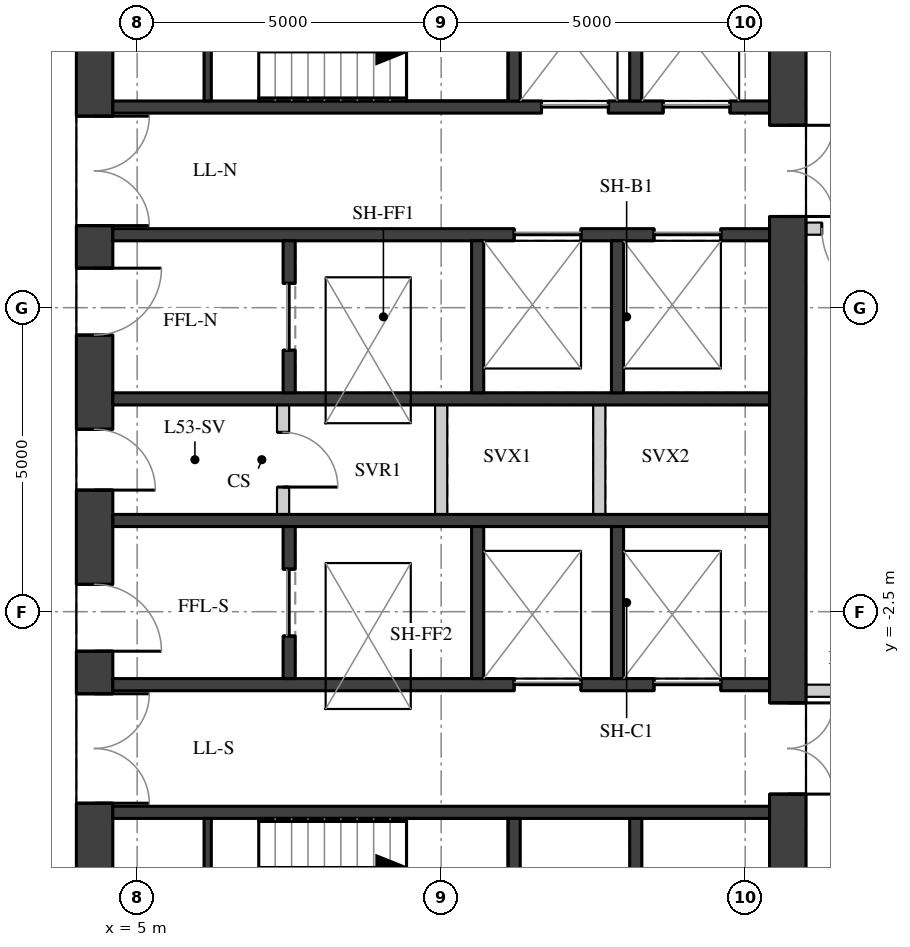
"""IFC4 building model, lengths in metres.
Left out: names, types, materials, properties, quantities, classifications, styles, units other than length and angle.
Written with IfcOpenShell. Run it as: python <this file> out.ifc"""

import sys

from ifc_helpers import new_model, si_unit, direction, frame, frame_2d, origin, place, context, subcontext, project, spatial, rectangle, extrude, element, fill, save


model = new_model("IFC4")
c1 = context("Model", 3, precision=1e-05, world=origin(), true_north=direction((0.0, 1.0)))
c2 = subcontext(c1, "Body", "Model", "MODEL_VIEW")
j1 = project(units=[si_unit("LENGTHUNIT", "METRE"), si_unit("PLANEANGLEUNIT", "RADIAN")], contexts=[c1])
p1 = place(None, origin())
s1 = spatial("IfcSite", under=j1, at=p1, CompositionType="ELEMENT")
p2 = place(p1, origin())
s2 = spatial("IfcBuilding", under=s1, at=p2, CompositionType="ELEMENT")
p3 = place(p2, frame((0.0, 0.0, 189.2)))
s3 = spatial("IfcBuildingStorey", under=s2, at=p3, CompositionType="ELEMENT", Elevation=189.2)
p4 = place(p3, frame((4.3, -9.4, 0.0), z_axis=(0.0, 0.0, 1.0), x_axis=(0.0, 1.0, 0.0)))
e1 = element("IfcWall", 1, at=p4, inside=s3, PredefinedType="SHEAR", context=c2, shape_type="SweptSolid", body=[
    extrude(rectangle(XDim=18.8, YDim=0.6, at=frame_2d((9.4, 0.0))), origin(), (0.0, 0.0, 1.0), 3.02),
])
p5 = place(p4, frame((0.65, 0.0, 0.0)))
e2 = element("IfcOpeningElement", 2, at=p5, cuts=e1, PredefinedType="OPENING", context=c2, shape_type="SweptSolid", body=[
    extrude(rectangle(XDim=1.5, YDim=2.1, at=frame_2d((0.75, 1.05))), frame((0.0, 0.31, 0.0), z_axis=(0.0, -1.0, 0.0), x_axis=(1.0, 0.0, 0.0)), (0.0, 0.0, 1.0), 0.62),
])
p6 = place(p4, frame((3.75, 0.0, 0.0)))
e3 = element("IfcOpeningElement", 3, at=p6, cuts=e1, PredefinedType="OPENING", context=c2, shape_type="SweptSolid", body=[
    extrude(rectangle(XDim=1.8, YDim=2.1, at=frame_2d((0.9, 1.05))), frame((0.0, 0.31, 0.0), z_axis=(0.0, -1.0, 0.0), x_axis=(1.0, 0.0, 0.0)), (0.0, 0.0, 1.0), 0.62),
])
p7 = place(p4, frame((6.25, 0.0, 0.0)))
e4 = element("IfcOpeningElement", 4, at=p7, cuts=e1, PredefinedType="OPENING", context=c2, shape_type="SweptSolid", body=[
    extrude(rectangle(XDim=1.1, YDim=2.1, at=frame_2d((0.55, 1.05))), frame((0.0, 0.31, 0.0), z_axis=(0.0, -1.0, 0.0), x_axis=(1.0, 0.0, 0.0)), (0.0, 0.0, 1.0), 0.62),
])
p8 = place(p4, frame((8.9, 0.0, 0.0)))
e5 = element("IfcOpeningElement", 5, at=p8, cuts=e1, PredefinedType="OPENING", context=c2, shape_type="SweptSolid", body=[
    extrude(rectangle(XDim=1.0, YDim=2.1, at=frame_2d((0.5, 1.05))), frame((0.0, 0.31, 0.0), z_axis=(0.0, -1.0, 0.0), x_axis=(1.0, 0.0, 0.0)), (0.0, 0.0, 1.0), 0.62),
])
p9 = place(p4, frame((11.45, 0.0, 0.0)))
e6 = element("IfcOpeningElement", 6, at=p9, cuts=e1, PredefinedType="OPENING", context=c2, shape_type="SweptSolid", body=[
    extrude(rectangle(XDim=1.1, YDim=2.1, at=frame_2d((0.55, 1.05))), frame((0.0, 0.31, 0.0), z_axis=(0.0, -1.0, 0.0), x_axis=(1.0, 0.0, 0.0)), (0.0, 0.0, 1.0), 0.62),
])
p10 = place(p4, frame((13.25, 0.0, 0.0)))
e7 = element("IfcOpeningElement", 7, at=p10, cuts=e1, PredefinedType="OPENING", context=c2, shape_type="SweptSolid", body=[
    extrude(rectangle(XDim=1.8, YDim=2.1, at=frame_2d((0.9, 1.05))), frame((0.0, 0.31, 0.0), z_axis=(0.0, -1.0, 0.0), x_axis=(1.0, 0.0, 0.0)), (0.0, 0.0, 1.0), 0.62),
])
p11 = place(p4, frame((16.65, 0.0, 0.0)))
e8 = element("IfcOpeningElement", 8, at=p11, cuts=e1, PredefinedType="OPENING", context=c2, shape_type="SweptSolid", body=[
    extrude(rectangle(XDim=1.5, YDim=2.1, at=frame_2d((0.75, 1.05))), frame((0.0, 0.31, 0.0), z_axis=(0.0, -1.0, 0.0), x_axis=(1.0, 0.0, 0.0)), (0.0, 0.0, 1.0), 0.62),
])
p12 = place(p3, frame((15.7, -9.4, 0.0), z_axis=(0.0, 0.0, 1.0), x_axis=(0.0, 1.0, 0.0)))
e9 = element("IfcWall", 9, at=p12, inside=s3, PredefinedType="SHEAR", context=c2, shape_type="SweptSolid", body=[
    extrude(rectangle(XDim=18.8, YDim=0.6, at=frame_2d((9.4, 0.0))), origin(), (0.0, 0.0, 1.0), 3.02),
])
p13 = place(p12, frame((13.4, 0.0, 0.0)))
e10 = element("IfcOpeningElement", 10, at=p13, cuts=e9, PredefinedType="OPENING", context=c2, shape_type="SweptSolid", body=[
    extrude(rectangle(XDim=1.5, YDim=2.1, at=frame_2d((0.75, 1.05))), frame((0.0, 0.31, 0.0), z_axis=(0.0, -1.0, 0.0), x_axis=(1.0, 0.0, 0.0)), (0.0, 0.0, 1.0), 0.62),
])
p14 = place(p12, frame((3.9, 0.0, 0.0)))
e11 = element("IfcOpeningElement", 11, at=p14, cuts=e9, PredefinedType="OPENING", context=c2, shape_type="SweptSolid", body=[
    extrude(rectangle(XDim=1.5, YDim=2.1, at=frame_2d((0.75, 1.05))), frame((0.0, 0.31, 0.0), z_axis=(0.0, -1.0, 0.0), x_axis=(1.0, 0.0, 0.0)), (0.0, 0.0, 1.0), 0.62),
])
p15 = place(p3, frame((4.6, 5.8, 0.0), z_axis=(0.0, 0.0, 1.0), x_axis=(1.0, 0.0, 0.0)))
e12 = element("IfcWall", 12, at=p15, inside=s3, PredefinedType="SHEAR", context=c2, shape_type="SweptSolid", body=[
    extrude(rectangle(XDim=10.8, YDim=0.2, at=frame_2d((5.4, 0.0))), origin(), (0.0, 0.0, 1.0), 3.02),
])
p16 = place(p15, frame((7.05, 0.0, 0.0)))
e13 = element("IfcOpeningElement", 13, at=p16, cuts=e12, PredefinedType="OPENING", context=c2, shape_type="SweptSolid", body=[
    extrude(rectangle(XDim=1.1, YDim=2.1, at=frame_2d((0.55, 1.05))), frame((0.0, 0.11, 0.0), z_axis=(0.0, -1.0, 0.0), x_axis=(1.0, 0.0, 0.0)), (0.0, 0.0, 1.0), 0.22),
])
p17 = place(p15, frame((9.05, 0.0, 0.0)))
e14 = element("IfcOpeningElement", 14, at=p17, cuts=e12, PredefinedType="OPENING", context=c2, shape_type="SweptSolid", body=[
    extrude(rectangle(XDim=1.1, YDim=2.1, at=frame_2d((0.55, 1.05))), frame((0.0, 0.11, 0.0), z_axis=(0.0, -1.0, 0.0), x_axis=(1.0, 0.0, 0.0)), (0.0, 0.0, 1.0), 0.22),
])
p18 = place(p3, frame((4.6, 3.7, 0.0), z_axis=(0.0, 0.0, 1.0), x_axis=(1.0, 0.0, 0.0)))
e15 = element("IfcWall", 15, at=p18, inside=s3, PredefinedType="SHEAR", context=c2, shape_type="SweptSolid", body=[
    extrude(rectangle(XDim=10.8, YDim=0.2, at=frame_2d((5.4, 0.0))), origin(), (0.0, 0.0, 1.0), 3.02),
])
p19 = place(p18, frame((6.6, 0.0, 0.0)))
e16 = element("IfcOpeningElement", 16, at=p19, cuts=e15, PredefinedType="OPENING", context=c2, shape_type="SweptSolid", body=[
    extrude(rectangle(XDim=1.1, YDim=2.1, at=frame_2d((0.55, 1.05))), frame((0.0, 0.11, 0.0), z_axis=(0.0, -1.0, 0.0), x_axis=(1.0, 0.0, 0.0)), (0.0, 0.0, 1.0), 0.22),
])
p20 = place(p18, frame((8.9, 0.0, 0.0)))
e17 = element("IfcOpeningElement", 17, at=p20, cuts=e15, PredefinedType="OPENING", context=c2, shape_type="SweptSolid", body=[
    extrude(rectangle(XDim=1.1, YDim=2.1, at=frame_2d((0.55, 1.05))), frame((0.0, 0.11, 0.0), z_axis=(0.0, -1.0, 0.0), x_axis=(1.0, 0.0, 0.0)), (0.0, 0.0, 1.0), 0.22),
])
for number, where, z_axis, x_axis in (
    (18, (4.6, 1.0, 0.0), (0.0, 0.0, 1.0), (1.0, 0.0, 0.0)),
    (19, (4.6, -1.0, 0.0), (0.0, 0.0, 1.0), (1.0, 0.0, 0.0)),
):
    element("IfcWall", number, at=place(p3, frame(where, z_axis=z_axis, x_axis=x_axis)), inside=s3, PredefinedType="SHEAR", context=c2, shape_type="SweptSolid", body=[
        extrude(rectangle(XDim=10.8, YDim=0.2, at=frame_2d((5.4, 0.0))), origin(), (0.0, 0.0, 1.0), 3.02),
    ])
p21 = place(p3, frame((4.6, -3.7, 0.0), z_axis=(0.0, 0.0, 1.0), x_axis=(1.0, 0.0, 0.0)))
e20 = element("IfcWall", 20, at=p21, inside=s3, PredefinedType="SHEAR", context=c2, shape_type="SweptSolid", body=[
    extrude(rectangle(XDim=10.8, YDim=0.2, at=frame_2d((5.4, 0.0))), origin(), (0.0, 0.0, 1.0), 3.02),
])
p22 = place(p21, frame((6.6, 0.0, 0.0)))
e21 = element("IfcOpeningElement", 21, at=p22, cuts=e20, PredefinedType="OPENING", context=c2, shape_type="SweptSolid", body=[
    extrude(rectangle(XDim=1.1, YDim=2.1, at=frame_2d((0.55, 1.05))), frame((0.0, 0.11, 0.0), z_axis=(0.0, -1.0, 0.0), x_axis=(1.0, 0.0, 0.0)), (0.0, 0.0, 1.0), 0.22),
])
p23 = place(p21, frame((8.9, 0.0, 0.0)))
e22 = element("IfcOpeningElement", 22, at=p23, cuts=e20, PredefinedType="OPENING", context=c2, shape_type="SweptSolid", body=[
    extrude(rectangle(XDim=1.1, YDim=2.1, at=frame_2d((0.55, 1.05))), frame((0.0, 0.11, 0.0), z_axis=(0.0, -1.0, 0.0), x_axis=(1.0, 0.0, 0.0)), (0.0, 0.0, 1.0), 0.22),
])
p24 = place(p3, frame((4.6, -5.8, 0.0), z_axis=(0.0, 0.0, 1.0), x_axis=(1.0, 0.0, 0.0)))
e23 = element("IfcWall", 23, at=p24, inside=s3, PredefinedType="SHEAR", context=c2, shape_type="SweptSolid", body=[
    extrude(rectangle(XDim=10.8, YDim=0.2, at=frame_2d((5.4, 0.0))), origin(), (0.0, 0.0, 1.0), 3.02),
])
for number, where, z_axis, x_axis in (
    (24, (11.2, 5.9, 0.0), (0.0, 0.0, 1.0), (0.0, 1.0, 0.0)),
    (25, (11.2, -9.4, 0.0), (0.0, 0.0, 1.0), (0.0, 1.0, 0.0)),
    (26, (13.2, 5.9, 0.0), (0.0, 0.0, 1.0), (0.0, 1.0, 0.0)),
    (27, (13.2, -9.4, 0.0), (0.0, 0.0, 1.0), (0.0, 1.0, 0.0)),
):
    element("IfcWall", number, at=place(p3, frame(where, z_axis=z_axis, x_axis=x_axis)), inside=s3, PredefinedType="SHEAR", context=c2, shape_type="SweptSolid", body=[
        extrude(rectangle(XDim=3.5, YDim=0.2, at=frame_2d((1.75, 0.0))), origin(), (0.0, 0.0, 1.0), 3.02),
    ])
p25 = place(p3, frame((7.5, 1.1, 0.0), z_axis=(0.0, 0.0, 1.0), x_axis=(0.0, 1.0, 0.0)))
e28 = element("IfcWall", 28, at=p25, inside=s3, PredefinedType="SHEAR", context=c2, shape_type="SweptSolid", body=[
    extrude(rectangle(XDim=2.5, YDim=0.2, at=frame_2d((1.25, 0.0))), origin(), (0.0, 0.0, 1.0), 3.02),
])
p26 = place(p25, frame((0.7, 0.0, 0.0)))
e29 = element("IfcOpeningElement", 29, at=p26, cuts=e28, PredefinedType="OPENING", context=c2, shape_type="SweptSolid", body=[
    extrude(rectangle(XDim=1.1, YDim=2.1, at=frame_2d((0.55, 1.05))), frame((0.0, 0.11, 0.0), z_axis=(0.0, -1.0, 0.0), x_axis=(1.0, 0.0, 0.0)), (0.0, 0.0, 1.0), 0.22),
])
p27 = place(p3, frame((7.5, -3.6, 0.0), z_axis=(0.0, 0.0, 1.0), x_axis=(0.0, 1.0, 0.0)))
e30 = element("IfcWall", 30, at=p27, inside=s3, PredefinedType="SHEAR", context=c2, shape_type="SweptSolid", body=[
    extrude(rectangle(XDim=2.5, YDim=0.2, at=frame_2d((1.25, 0.0))), origin(), (0.0, 0.0, 1.0), 3.02),
])
p28 = place(p27, frame((0.7, 0.0, 0.0)))
e31 = element("IfcOpeningElement", 31, at=p28, cuts=e30, PredefinedType="OPENING", context=c2, shape_type="SweptSolid", body=[
    extrude(rectangle(XDim=1.1, YDim=2.1, at=frame_2d((0.55, 1.05))), frame((0.0, 0.11, 0.0), z_axis=(0.0, -1.0, 0.0), x_axis=(1.0, 0.0, 0.0)), (0.0, 0.0, 1.0), 0.22),
])
for number, where, z_axis, x_axis in (
    (32, (10.6, 1.1, 0.0), (0.0, 0.0, 1.0), (0.0, 1.0, 0.0)),
    (33, (10.6, -3.6, 0.0), (0.0, 0.0, 1.0), (0.0, 1.0, 0.0)),
    (34, (12.9, 1.1, 0.0), (0.0, 0.0, 1.0), (0.0, 1.0, 0.0)),
    (35, (12.9, -3.6, 0.0), (0.0, 0.0, 1.0), (0.0, 1.0, 0.0)),
):
    element("IfcWall", number, at=place(p3, frame(where, z_axis=z_axis, x_axis=x_axis)), inside=s3, PredefinedType="SHEAR", context=c2, shape_type="SweptSolid", body=[
        extrude(rectangle(XDim=2.5, YDim=0.2, at=frame_2d((1.25, 0.0))), origin(), (0.0, 0.0, 1.0), 3.02),
    ])
p29 = place(p3, frame((6.16, 5.9, 0.0), z_axis=(0.0, 0.0, 1.0), x_axis=(0.0, 1.0, 0.0)))
e36 = element("IfcWall", 36, at=p29, inside=s3, PredefinedType="SHEAR", context=c2, shape_type="SweptSolid", body=[
    extrude(rectangle(XDim=3.5, YDim=0.12, at=frame_2d((1.75, 0.0))), origin(), (0.0, 0.0, 1.0), 3.02),
])
p30 = place(p29, frame((0.85, 0.0, 0.0)))
e37 = element("IfcOpeningElement", 37, at=p30, cuts=e36, PredefinedType="OPENING", context=c2, shape_type="SweptSolid", body=[
    extrude(rectangle(XDim=1.5, YDim=2.1, at=frame_2d((0.75, 1.05))), frame((0.0, 0.07, 0.0), z_axis=(0.0, -1.0, 0.0), x_axis=(1.0, 0.0, 0.0)), (0.0, 0.0, 1.0), 0.14),
])
p31 = place(p3, frame((6.16, -9.4, 0.0), z_axis=(0.0, 0.0, 1.0), x_axis=(0.0, 1.0, 0.0)))
e38 = element("IfcWall", 38, at=p31, inside=s3, PredefinedType="SHEAR", context=c2, shape_type="SweptSolid", body=[
    extrude(rectangle(XDim=3.5, YDim=0.12, at=frame_2d((1.75, 0.0))), origin(), (0.0, 0.0, 1.0), 3.02),
])
p32 = place(p31, frame((1.15, 0.0, 0.0)))
e39 = element("IfcOpeningElement", 39, at=p32, cuts=e38, PredefinedType="OPENING", context=c2, shape_type="SweptSolid", body=[
    extrude(rectangle(XDim=1.5, YDim=2.1, at=frame_2d((0.75, 1.05))), frame((0.0, 0.07, 0.0), z_axis=(0.0, -1.0, 0.0), x_axis=(1.0, 0.0, 0.0)), (0.0, 0.0, 1.0), 0.14),
])
p33 = place(p3, frame((7.4, -0.9, 0.0), z_axis=(0.0, 0.0, 1.0), x_axis=(0.0, 1.0, 0.0)))
e40 = element("IfcWall", 40, at=p33, inside=s3, PredefinedType="PARTITIONING", context=c2, shape_type="SweptSolid", body=[
    extrude(rectangle(XDim=1.8, YDim=0.2, at=frame_2d((0.9, 0.0))), origin(), (0.0, 0.0, 1.0), 3.02),
])
p34 = place(p33, frame((0.45, 0.0, 0.0)))
e41 = element("IfcOpeningElement", 41, at=p34, cuts=e40, PredefinedType="OPENING", context=c2, shape_type="SweptSolid", body=[
    extrude(rectangle(XDim=0.9, YDim=2.1, at=frame_2d((0.45, 1.05))), frame((0.0, 0.11, 0.0), z_axis=(0.0, -1.0, 0.0), x_axis=(1.0, 0.0, 0.0)), (0.0, 0.0, 1.0), 0.22),
])
for number, where, z_axis, x_axis in (
    (42, (10.0, -0.9, 0.0), (0.0, 0.0, 1.0), (0.0, 1.0, 0.0)),
    (43, (12.6, -0.9, 0.0), (0.0, 0.0, 1.0), (0.0, 1.0, 0.0)),
):
    element("IfcWall", number, at=place(p3, frame(where, z_axis=z_axis, x_axis=x_axis)), inside=s3, PredefinedType="PARTITIONING", context=c2, shape_type="SweptSolid", body=[
        extrude(rectangle(XDim=1.8, YDim=0.2, at=frame_2d((0.9, 0.0))), origin(), (0.0, 0.0, 1.0), 3.02),
    ])
p35 = place(p3, frame((17.6, 3.8, 0.0), z_axis=(0.0, 0.0, 1.0), x_axis=(-1.0, 0.0, 0.0)))
e44 = element("IfcWall", 44, at=p35, inside=s3, PredefinedType="PARTITIONING", context=c2, shape_type="SweptSolid", body=[
    extrude(rectangle(XDim=1.596, YDim=0.2, at=frame_2d((0.798, 0.0))), origin(), (0.0, 0.0, 1.0), 3.02),
])
p36 = place(p35, frame((0.14, 0.0, 0.0)))
e45 = element("IfcOpeningElement", 45, at=p36, cuts=e44, PredefinedType="OPENING", context=c2, shape_type="SweptSolid", body=[
    extrude(rectangle(XDim=1.2, YDim=2.1, at=frame_2d((0.6, 1.05))), frame((0.0, 0.11, 0.0), z_axis=(0.0, -1.0, 0.0), x_axis=(1.0, 0.0, 0.0)), (0.0, 0.0, 1.0), 0.22),
])
p37 = place(p3, frame((16.004, -3.8, 0.0), z_axis=(0.0, 0.0, 1.0), x_axis=(1.0, 0.0, 0.0)))
e46 = element("IfcWall", 46, at=p37, inside=s3, PredefinedType="PARTITIONING", context=c2, shape_type="SweptSolid", body=[
    extrude(rectangle(XDim=1.596, YDim=0.2, at=frame_2d((0.798, 0.0))), origin(), (0.0, 0.0, 1.0), 2.47),
])
p38 = place(p6, origin())
e47 = element("IfcDoor", 47, at=p38, inside=s3, OperationType="DOUBLE_DOOR_SINGLE_SWING", PredefinedType="DOOR", context=c2, shape_type="SweptSolid", body=[
    extrude(rectangle(XDim=1.8, YDim=2.1, at=frame_2d((0.9, 1.05))), frame((0.0, 0.025, 0.0), z_axis=(0.0, -1.0, 0.0), x_axis=(1.0, 0.0, 0.0)), (0.0, 0.0, 1.0), 0.05),
])
fill(e3, e47)
p39 = place(p7, origin())
e48 = element("IfcDoor", 48, at=p39, inside=s3, OperationType="SINGLE_SWING_RIGHT", PredefinedType="DOOR", context=c2, shape_type="SweptSolid", body=[
    extrude(rectangle(XDim=1.1, YDim=2.1, at=frame_2d((0.55, 1.05))), frame((0.0, 0.025, 0.0), z_axis=(0.0, -1.0, 0.0), x_axis=(1.0, 0.0, 0.0)), (0.0, 0.0, 1.0), 0.05),
])
fill(e4, e48)
p40 = place(p8, origin())
e49 = element("IfcDoor", 49, at=p40, inside=s3, OperationType="SINGLE_SWING_RIGHT", PredefinedType="DOOR", context=c2, shape_type="SweptSolid", body=[
    extrude(rectangle(XDim=1.0, YDim=2.1, at=frame_2d((0.5, 1.05))), frame((0.0, 0.025, 0.0), z_axis=(0.0, -1.0, 0.0), x_axis=(1.0, 0.0, 0.0)), (0.0, 0.0, 1.0), 0.05),
])
fill(e5, e49)
p41 = place(p9, origin())
e50 = element("IfcDoor", 50, at=p41, inside=s3, OperationType="SINGLE_SWING_LEFT", PredefinedType="DOOR", context=c2, shape_type="SweptSolid", body=[
    extrude(rectangle(XDim=1.1, YDim=2.1, at=frame_2d((0.55, 1.05))), frame((0.0, 0.025, 0.0), z_axis=(0.0, -1.0, 0.0), x_axis=(1.0, 0.0, 0.0)), (0.0, 0.0, 1.0), 0.05),
])
fill(e6, e50)
p42 = place(p10, origin())
e51 = element("IfcDoor", 51, at=p42, inside=s3, OperationType="DOUBLE_DOOR_SINGLE_SWING", PredefinedType="DOOR", context=c2, shape_type="SweptSolid", body=[
    extrude(rectangle(XDim=1.8, YDim=2.1, at=frame_2d((0.9, 1.05))), frame((0.0, 0.025, 0.0), z_axis=(0.0, -1.0, 0.0), x_axis=(1.0, 0.0, 0.0)), (0.0, 0.0, 1.0), 0.05),
])
fill(e7, e51)
p43 = place(p13, origin())
e52 = element("IfcDoor", 52, at=p43, inside=s3, OperationType="DOUBLE_DOOR_SINGLE_SWING", PredefinedType="DOOR", context=c2, shape_type="SweptSolid", body=[
    extrude(rectangle(XDim=1.5, YDim=2.1, at=frame_2d((0.75, 1.05))), frame((0.0, 0.025, 0.0), z_axis=(0.0, -1.0, 0.0), x_axis=(1.0, 0.0, 0.0)), (0.0, 0.0, 1.0), 0.05),
])
fill(e10, e52)
p44 = place(p14, origin())
e53 = element("IfcDoor", 53, at=p44, inside=s3, OperationType="DOUBLE_DOOR_SINGLE_SWING", PredefinedType="DOOR", context=c2, shape_type="SweptSolid", body=[
    extrude(rectangle(XDim=1.5, YDim=2.1, at=frame_2d((0.75, 1.05))), frame((0.0, 0.025, 0.0), z_axis=(0.0, -1.0, 0.0), x_axis=(1.0, 0.0, 0.0)), (0.0, 0.0, 1.0), 0.05),
])
fill(e11, e53)
p45 = place(p16, origin())
e54 = element("IfcDoor", 54, at=p45, inside=s3, OperationType="DOUBLE_DOOR_SLIDING", PredefinedType="DOOR", context=c2, shape_type="SweptSolid", body=[
    extrude(rectangle(XDim=1.1, YDim=2.1, at=frame_2d((0.55, 1.05))), frame((0.0, 0.025, 0.0), z_axis=(0.0, -1.0, 0.0), x_axis=(1.0, 0.0, 0.0)), (0.0, 0.0, 1.0), 0.05),
])
fill(e13, e54)
p46 = place(p17, origin())
e55 = element("IfcDoor", 55, at=p46, inside=s3, OperationType="DOUBLE_DOOR_SLIDING", PredefinedType="DOOR", context=c2, shape_type="SweptSolid", body=[
    extrude(rectangle(XDim=1.1, YDim=2.1, at=frame_2d((0.55, 1.05))), frame((0.0, 0.025, 0.0), z_axis=(0.0, -1.0, 0.0), x_axis=(1.0, 0.0, 0.0)), (0.0, 0.0, 1.0), 0.05),
])
fill(e14, e55)
p47 = place(p19, origin())
e56 = element("IfcDoor", 56, at=p47, inside=s3, OperationType="DOUBLE_DOOR_SLIDING", PredefinedType="DOOR", context=c2, shape_type="SweptSolid", body=[
    extrude(rectangle(XDim=1.1, YDim=2.1, at=frame_2d((0.55, 1.05))), frame((0.0, 0.025, 0.0), z_axis=(0.0, -1.0, 0.0), x_axis=(1.0, 0.0, 0.0)), (0.0, 0.0, 1.0), 0.05),
])
fill(e16, e56)
p48 = place(p20, origin())
e57 = element("IfcDoor", 57, at=p48, inside=s3, OperationType="DOUBLE_DOOR_SLIDING", PredefinedType="DOOR", context=c2, shape_type="SweptSolid", body=[
    extrude(rectangle(XDim=1.1, YDim=2.1, at=frame_2d((0.55, 1.05))), frame((0.0, 0.025, 0.0), z_axis=(0.0, -1.0, 0.0), x_axis=(1.0, 0.0, 0.0)), (0.0, 0.0, 1.0), 0.05),
])
fill(e17, e57)
p49 = place(p22, origin())
e58 = element("IfcDoor", 58, at=p49, inside=s3, OperationType="DOUBLE_DOOR_SLIDING", PredefinedType="DOOR", context=c2, shape_type="SweptSolid", body=[
    extrude(rectangle(XDim=1.1, YDim=2.1, at=frame_2d((0.55, 1.05))), frame((0.0, 0.025, 0.0), z_axis=(0.0, -1.0, 0.0), x_axis=(1.0, 0.0, 0.0)), (0.0, 0.0, 1.0), 0.05),
])
fill(e21, e58)
p50 = place(p23, origin())
e59 = element("IfcDoor", 59, at=p50, inside=s3, OperationType="DOUBLE_DOOR_SLIDING", PredefinedType="DOOR", context=c2, shape_type="SweptSolid", body=[
    extrude(rectangle(XDim=1.1, YDim=2.1, at=frame_2d((0.55, 1.05))), frame((0.0, 0.025, 0.0), z_axis=(0.0, -1.0, 0.0), x_axis=(1.0, 0.0, 0.0)), (0.0, 0.0, 1.0), 0.05),
])
fill(e22, e59)
p51 = place(p26, origin())
e60 = element("IfcDoor", 60, at=p51, inside=s3, OperationType="DOUBLE_DOOR_SLIDING", PredefinedType="DOOR", context=c2, shape_type="SweptSolid", body=[
    extrude(rectangle(XDim=1.1, YDim=2.1, at=frame_2d((0.55, 1.05))), frame((0.0, 0.025, 0.0), z_axis=(0.0, -1.0, 0.0), x_axis=(1.0, 0.0, 0.0)), (0.0, 0.0, 1.0), 0.05),
])
fill(e29, e60)
p52 = place(p28, origin())
e61 = element("IfcDoor", 61, at=p52, inside=s3, OperationType="DOUBLE_DOOR_SLIDING", PredefinedType="DOOR", context=c2, shape_type="SweptSolid", body=[
    extrude(rectangle(XDim=1.1, YDim=2.1, at=frame_2d((0.55, 1.05))), frame((0.0, 0.025, 0.0), z_axis=(0.0, -1.0, 0.0), x_axis=(1.0, 0.0, 0.0)), (0.0, 0.0, 1.0), 0.05),
])
fill(e31, e61)
p53 = place(p34, origin())
e62 = element("IfcDoor", 62, at=p53, inside=s3, OperationType="SINGLE_SWING_RIGHT", PredefinedType="DOOR", context=c2, shape_type="SweptSolid", body=[
    extrude(rectangle(XDim=0.9, YDim=2.1, at=frame_2d((0.45, 1.05))), frame((0.0, 0.025, 0.0), z_axis=(0.0, -1.0, 0.0), x_axis=(1.0, 0.0, 0.0)), (0.0, 0.0, 1.0), 0.05),
])
fill(e41, e62)
p54 = place(p36, origin())
e63 = element("IfcDoor", 63, at=p54, inside=s3, OperationType="SINGLE_SWING_LEFT", PredefinedType="DOOR", context=c2, shape_type="SweptSolid", body=[
    extrude(rectangle(XDim=1.2, YDim=2.1, at=frame_2d((0.6, 1.05))), frame((0.0, 0.025, 0.0), z_axis=(0.0, -1.0, 0.0), x_axis=(1.0, 0.0, 0.0)), (0.0, 0.0, 1.0), 0.05),
])
fill(e45, e63)
save(model, sys.argv[1])
